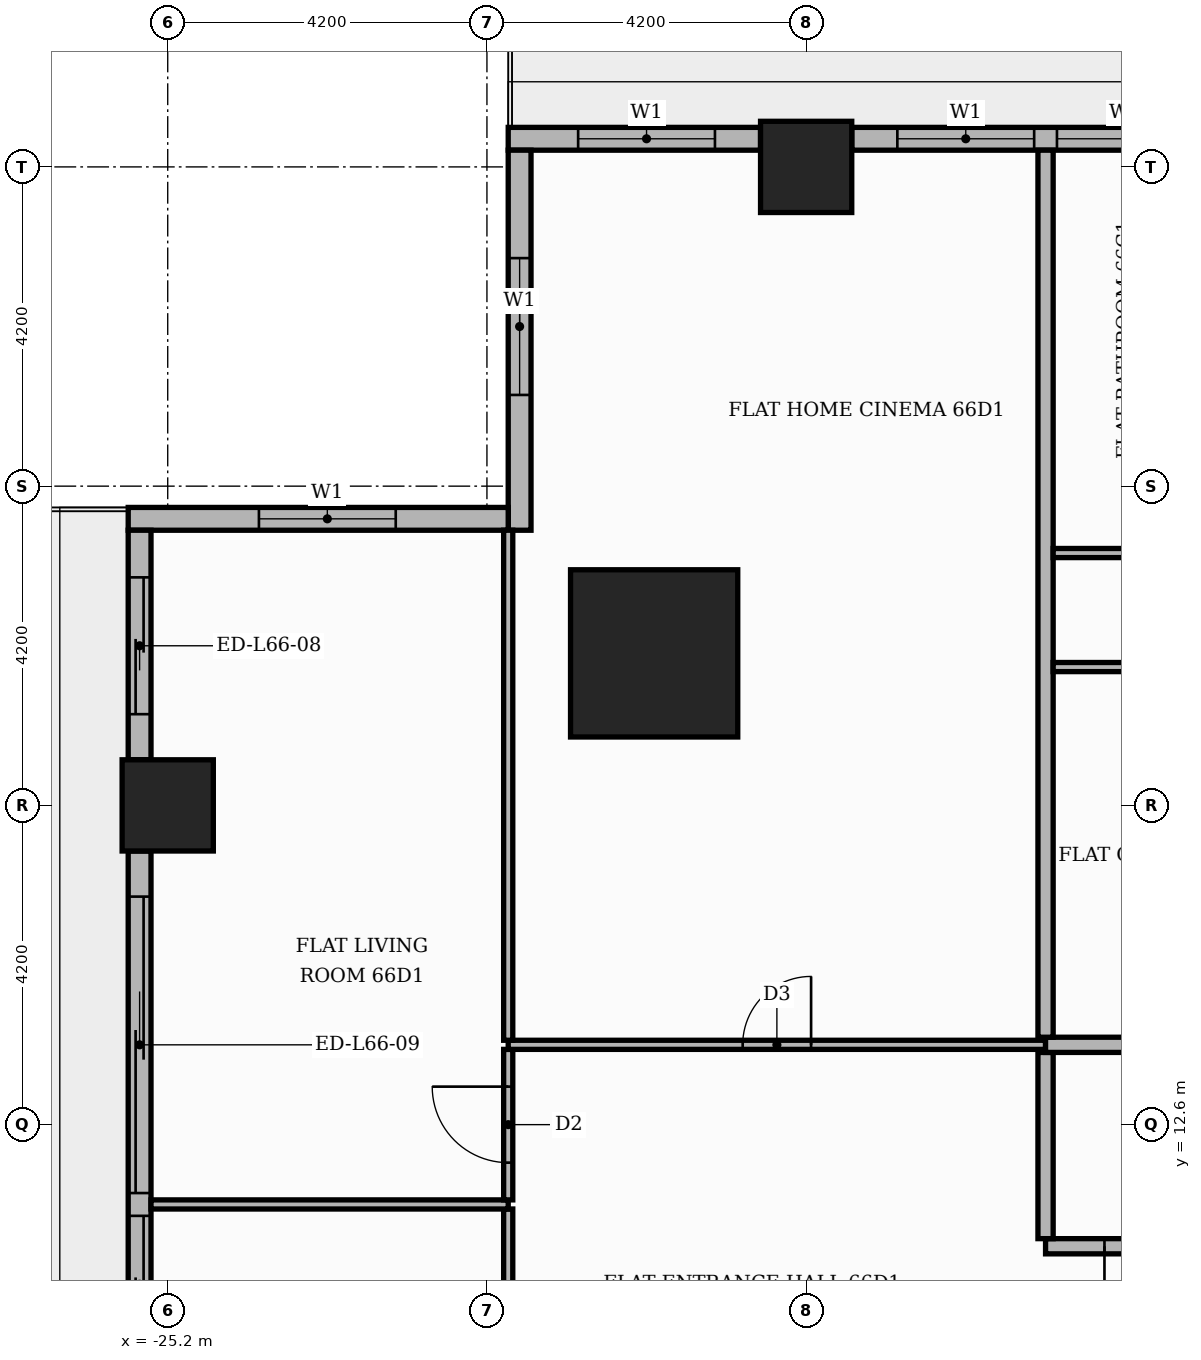
"""IFC4 building model, lengths in metres.
Left out: names, types, materials, properties, quantities, classifications, styles, units other than length and angle.
Written with IfcOpenShell. Run it as: python <this file> out.ifc"""

import sys

from ifc_helpers import new_model, si_unit, direction, frame, frame_2d, origin, origin_2d, place, context, subcontext, project, spatial, rectangle, extrude, element, fill, save


model = new_model("IFC4")
c1 = context("Model", 3, precision=1e-05, world=origin(), true_north=direction((0.0, 1.0)))
c2 = subcontext(c1, "Body", "Model", "MODEL_VIEW")
j1 = project(units=[si_unit("LENGTHUNIT", "METRE"), si_unit("PLANEANGLEUNIT", "RADIAN")], contexts=[c1])
p1 = place(None, origin())
s1 = spatial("IfcSite", under=j1, at=p1, CompositionType="ELEMENT")
p2 = place(p1, origin())
s2 = spatial("IfcBuilding", under=s1, at=p2, CompositionType="ELEMENT")
p3 = place(p2, frame((0.0, 0.0, 275.7)))
s3 = spatial("IfcBuildingStorey", under=s2, at=p3, CompositionType="ELEMENT", Elevation=275.7)
p4 = place(p3, frame((-18.8, 18.8, 0.0), z_axis=(0.0, 0.0, 1.0), x_axis=(1.0, 0.0, 0.0)))
e1 = element("IfcColumn", 1, at=p4, inside=s3, PredefinedType="COLUMN", context=c2, shape_type="SweptSolid", body=[
    extrude(rectangle(XDim=2.2, YDim=2.2, at=origin_2d()), origin(), (0.0, 0.0, 1.0), 3.9),
])
for number, where, z_axis, x_axis in (
    (2, (-16.8, 25.2, 0.0), (0.0, 0.0, 1.0), (1.0, 0.0, 0.0)),
    (3, (-25.2, 16.8, 0.0), (0.0, 0.0, 1.0), (1.0, 0.0, 0.0)),
):
    element("IfcColumn", number, at=place(p3, frame(where, z_axis=z_axis, x_axis=x_axis)), inside=s3, PredefinedType="COLUMN", context=c2, shape_type="SweptSolid", body=[
        extrude(rectangle(XDim=1.2, YDim=1.2, at=origin_2d()), origin(), (0.0, 0.0, 1.0), 3.9),
    ])
p5 = place(p3, frame((-9.0, 25.57, 0.0), z_axis=(0.0, 0.0, 1.0), x_axis=(-1.0, 0.0, 0.0)))
e4 = element("IfcWall", 4, at=p5, inside=s3, PredefinedType="STANDARD", context=c2, shape_type="SweptSolid", body=[
    extrude(rectangle(XDim=7.2, YDim=0.3, at=frame_2d((3.6, 0.0))), origin(), (0.0, 0.0, 1.0), 3.48),
])
p6 = place(p5, frame((0.6, 0.0, 0.9)))
e5 = element("IfcOpeningElement", 5, at=p6, cuts=e4, PredefinedType="OPENING", context=c2, shape_type="SweptSolid", body=[
    extrude(rectangle(XDim=1.8, YDim=2.1, at=frame_2d((0.9, 1.05))), frame((0.0, 0.16, 0.0), z_axis=(0.0, -1.0, 0.0), x_axis=(1.0, 0.0, 0.0)), (0.0, 0.0, 1.0), 0.32),
])
p7 = place(p5, frame((2.7, 0.0, 0.9)))
e6 = element("IfcOpeningElement", 6, at=p7, cuts=e4, PredefinedType="OPENING", context=c2, shape_type="SweptSolid", body=[
    extrude(rectangle(XDim=1.8, YDim=2.1, at=frame_2d((0.9, 1.05))), frame((0.0, 0.16, 0.0), z_axis=(0.0, -1.0, 0.0), x_axis=(1.0, 0.0, 0.0)), (0.0, 0.0, 1.0), 0.32),
])
p8 = place(p5, frame((4.8, 0.0, 0.9)))
e7 = element("IfcOpeningElement", 7, at=p8, cuts=e4, PredefinedType="OPENING", context=c2, shape_type="SweptSolid", body=[
    extrude(rectangle(XDim=1.8, YDim=2.1, at=frame_2d((0.9, 1.05))), frame((0.0, 0.16, 0.0), z_axis=(0.0, -1.0, 0.0), x_axis=(1.0, 0.0, 0.0)), (0.0, 0.0, 1.0), 0.32),
])
p9 = place(p3, frame((-17.4, 25.57, 0.0), z_axis=(0.0, 0.0, 1.0), x_axis=(-1.0, 0.0, 0.0)))
e8 = element("IfcWall", 8, at=p9, inside=s3, PredefinedType="STANDARD", context=c2, shape_type="SweptSolid", body=[
    extrude(rectangle(XDim=3.32, YDim=0.3, at=frame_2d((1.66, 0.0))), origin(), (0.0, 0.0, 1.0), 3.48),
])
p10 = place(p9, frame((0.6, 0.0, 0.9)))
e9 = element("IfcOpeningElement", 9, at=p10, cuts=e8, PredefinedType="OPENING", context=c2, shape_type="SweptSolid", body=[
    extrude(rectangle(XDim=1.8, YDim=2.1, at=frame_2d((0.9, 1.05))), frame((0.0, 0.16, 0.0), z_axis=(0.0, -1.0, 0.0), x_axis=(1.0, 0.0, 0.0)), (0.0, 0.0, 1.0), 0.32),
])
p11 = place(p3, frame((-20.57, 25.42, 0.0), z_axis=(0.0, 0.0, 1.0), x_axis=(0.0, -1.0, 0.0)))
e10 = element("IfcWall", 10, at=p11, inside=s3, PredefinedType="STANDARD", context=c2, shape_type="SweptSolid", body=[
    extrude(rectangle(XDim=5.0, YDim=0.3, at=frame_2d((2.5, 0.0))), origin(), (0.0, 0.0, 1.0), 3.48),
])
p12 = place(p11, frame((1.42, 0.0, 0.9)))
e11 = element("IfcOpeningElement", 11, at=p12, cuts=e10, PredefinedType="OPENING", context=c2, shape_type="SweptSolid", body=[
    extrude(rectangle(XDim=1.8, YDim=2.1, at=frame_2d((0.9, 1.05))), frame((0.0, 0.16, 0.0), z_axis=(0.0, -1.0, 0.0), x_axis=(1.0, 0.0, 0.0)), (0.0, 0.0, 1.0), 0.32),
])
p13 = place(p3, frame((-20.72, 20.57, 0.0), z_axis=(0.0, 0.0, 1.0), x_axis=(-1.0, 0.0, 0.0)))
e12 = element("IfcWall", 12, at=p13, inside=s3, PredefinedType="STANDARD", context=c2, shape_type="SweptSolid", body=[
    extrude(rectangle(XDim=5.0, YDim=0.3, at=frame_2d((2.5, 0.0))), origin(), (0.0, 0.0, 1.0), 3.48),
])
p14 = place(p13, frame((1.48, 0.0, 0.9)))
e13 = element("IfcOpeningElement", 13, at=p14, cuts=e12, PredefinedType="OPENING", context=c2, shape_type="SweptSolid", body=[
    extrude(rectangle(XDim=1.8, YDim=2.1, at=frame_2d((0.9, 1.05))), frame((0.0, 0.16, 0.0), z_axis=(0.0, -1.0, 0.0), x_axis=(1.0, 0.0, 0.0)), (0.0, 0.0, 1.0), 0.32),
])
p15 = place(p3, frame((-25.57, 20.42, 0.0), z_axis=(0.0, 0.0, 1.0), x_axis=(0.0, -1.0, 0.0)))
e14 = element("IfcWall", 14, at=p15, inside=s3, PredefinedType="STANDARD", context=c2, shape_type="SweptSolid", body=[
    extrude(rectangle(XDim=3.02, YDim=0.3, at=frame_2d((1.51, 0.0))), origin(), (0.0, 0.0, 1.0), 3.48),
])
p16 = place(p15, frame((0.62, 0.0, 0.0)))
e15 = element("IfcOpeningElement", 15, at=p16, cuts=e14, PredefinedType="OPENING", context=c2, shape_type="SweptSolid", body=[
    extrude(rectangle(XDim=1.8, YDim=2.4, at=frame_2d((0.9, 1.2))), frame((0.0, 0.16, 0.0), z_axis=(0.0, -1.0, 0.0), x_axis=(1.0, 0.0, 0.0)), (0.0, 0.0, 1.0), 0.32),
])
p17 = place(p3, frame((-25.57, 16.2, 0.0), z_axis=(0.0, 0.0, 1.0), x_axis=(0.0, -1.0, 0.0)))
e16 = element("IfcWall", 16, at=p17, inside=s3, PredefinedType="STANDARD", context=c2, shape_type="SweptSolid", body=[
    extrude(rectangle(XDim=7.2, YDim=0.3, at=frame_2d((3.6, 0.0))), origin(), (0.0, 0.0, 1.0), 3.48),
])
p18 = place(p17, frame((0.6, 0.0, 0.0)))
e17 = element("IfcOpeningElement", 17, at=p18, cuts=e16, PredefinedType="OPENING", context=c2, shape_type="SweptSolid", body=[
    extrude(rectangle(XDim=3.9, YDim=2.4, at=frame_2d((1.95, 1.2))), frame((0.0, 0.16, 0.0), z_axis=(0.0, -1.0, 0.0), x_axis=(1.0, 0.0, 0.0)), (0.0, 0.0, 1.0), 0.32),
])
p19 = place(p17, frame((4.8, 0.0, 0.0)))
e18 = element("IfcOpeningElement", 18, at=p19, cuts=e16, PredefinedType="OPENING", context=c2, shape_type="SweptSolid", body=[
    extrude(rectangle(XDim=1.8, YDim=2.4, at=frame_2d((0.9, 1.2))), frame((0.0, 0.16, 0.0), z_axis=(0.0, -1.0, 0.0), x_axis=(1.0, 0.0, 0.0)), (0.0, 0.0, 1.0), 0.32),
])
p20 = place(p3, frame((-20.72, 7.41, 0.0), z_axis=(0.0, 0.0, 1.0), x_axis=(0.0, 1.0, 0.0)))
e19 = element("IfcWall", 19, at=p20, inside=s3, PredefinedType="PARTITIONING", context=c2, shape_type="SweptSolid", body=[
    extrude(rectangle(XDim=4.08, YDim=0.12, at=frame_2d((2.04, 0.0))), origin(), (0.0, 0.0, 1.0), 3.48),
])
p21 = place(p20, frame((1.59, 0.0, 0.0)))
e20 = element("IfcOpeningElement", 20, at=p21, cuts=e19, PredefinedType="OPENING", context=c2, shape_type="SweptSolid", body=[
    extrude(rectangle(XDim=0.9, YDim=2.1, at=frame_2d((0.45, 1.05))), frame((0.0, 0.07, 0.0), z_axis=(0.0, -1.0, 0.0), x_axis=(1.0, 0.0, 0.0)), (0.0, 0.0, 1.0), 0.14),
])
p22 = place(p3, frame((-13.65, 11.0, 0.0), z_axis=(0.0, 0.0, 1.0), x_axis=(1.0, 0.0, 0.0)))
e21 = element("IfcWall", 21, at=p22, inside=s3, PredefinedType="PARTITIONING", context=c2, shape_type="SweptSolid", body=[
    extrude(rectangle(XDim=2.65, YDim=0.2, at=frame_2d((1.325, 0.0))), origin(), (0.0, 0.0, 1.0), 3.48),
])
p23 = place(p22, frame((0.775, 0.0, 0.0)))
e22 = element("IfcOpeningElement", 22, at=p23, cuts=e21, PredefinedType="OPENING", context=c2, shape_type="SweptSolid", body=[
    extrude(rectangle(XDim=1.1, YDim=2.4, at=frame_2d((0.55, 1.2))), frame((0.0, 0.11, 0.0), z_axis=(0.0, -1.0, 0.0), x_axis=(1.0, 0.0, 0.0)), (0.0, 0.0, 1.0), 0.22),
])
p24 = place(p3, frame((-13.65, 11.1, 0.0), z_axis=(0.0, 0.0, 1.0), x_axis=(0.0, 1.0, 0.0)))
e23 = element("IfcWall", 23, at=p24, inside=s3, PredefinedType="PARTITIONING", context=c2, shape_type="SweptSolid", body=[
    extrude(rectangle(XDim=2.45, YDim=0.2, at=frame_2d((1.225, 0.0))), origin(), (0.0, 0.0, 1.0), 3.48),
])
p25 = place(p3, frame((-25.42, 11.55, 0.0), z_axis=(0.0, 0.0, 1.0), x_axis=(1.0, 0.0, 0.0)))
e24 = element("IfcWall", 24, at=p25, inside=s3, PredefinedType="PARTITIONING", context=c2, shape_type="SweptSolid", body=[
    extrude(rectangle(XDim=4.7, YDim=0.12, at=frame_2d((2.35, 0.0))), origin(), (0.0, 0.0, 1.0), 3.48),
])
p26 = place(p3, frame((-20.72, 11.61, 0.0), z_axis=(0.0, 0.0, 1.0), x_axis=(0.0, 1.0, 0.0)))
e25 = element("IfcWall", 25, at=p26, inside=s3, PredefinedType="PARTITIONING", context=c2, shape_type="SweptSolid", body=[
    extrude(rectangle(XDim=1.98, YDim=0.12, at=frame_2d((0.99, 0.0))), origin(), (0.0, 0.0, 1.0), 3.48),
])
p27 = place(p26, frame((0.49, 0.0, 0.0)))
e26 = element("IfcOpeningElement", 26, at=p27, cuts=e25, PredefinedType="OPENING", context=c2, shape_type="SweptSolid", body=[
    extrude(rectangle(XDim=1.0, YDim=2.1, at=frame_2d((0.5, 1.05))), frame((0.0, 0.07, 0.0), z_axis=(0.0, -1.0, 0.0), x_axis=(1.0, 0.0, 0.0)), (0.0, 0.0, 1.0), 0.14),
])
p28 = place(p3, frame((-20.72, 13.65, 0.0), z_axis=(0.0, 0.0, 1.0), x_axis=(1.0, 0.0, 0.0)))
e27 = element("IfcWall", 27, at=p28, inside=s3, PredefinedType="PARTITIONING", context=c2, shape_type="SweptSolid", body=[
    extrude(rectangle(XDim=7.07, YDim=0.12, at=frame_2d((3.535, 0.0))), origin(), (0.0, 0.0, 1.0), 3.48),
])
p29 = place(p28, frame((3.085, 0.0, 0.0)))
e28 = element("IfcOpeningElement", 28, at=p29, cuts=e27, PredefinedType="OPENING", context=c2, shape_type="SweptSolid", body=[
    extrude(rectangle(XDim=0.9, YDim=2.1, at=frame_2d((0.45, 1.05))), frame((0.0, 0.07, 0.0), z_axis=(0.0, -1.0, 0.0), x_axis=(1.0, 0.0, 0.0)), (0.0, 0.0, 1.0), 0.14),
])
p30 = place(p3, frame((-13.65, 13.65, 0.0), z_axis=(0.0, 0.0, 1.0), x_axis=(1.0, 0.0, 0.0)))
e29 = element("IfcWall", 29, at=p30, inside=s3, PredefinedType="PARTITIONING", context=c2, shape_type="SweptSolid", body=[
    extrude(rectangle(XDim=39.07, YDim=0.2, at=frame_2d((19.535, 0.0))), origin(), (0.0, 0.0, 1.0), 3.48),
])
p31 = place(p30, frame((23.6, 0.0, 0.0)))
e30 = element("IfcOpeningElement", 30, at=p31, cuts=e29, PredefinedType="OPENING", context=c2, shape_type="SweptSolid", body=[
    extrude(rectangle(XDim=1.1, YDim=2.4, at=frame_2d((0.55, 1.2))), frame((0.0, 0.11, 0.0), z_axis=(0.0, -1.0, 0.0), x_axis=(1.0, 0.0, 0.0)), (0.0, 0.0, 1.0), 0.22),
])
p32 = place(p3, frame((-20.72, 13.71, 0.0), z_axis=(0.0, 0.0, 1.0), x_axis=(0.0, 1.0, 0.0)))
e31 = element("IfcWall", 31, at=p32, inside=s3, PredefinedType="PARTITIONING", context=c2, shape_type="SweptSolid", body=[
    extrude(rectangle(XDim=6.71, YDim=0.12, at=frame_2d((3.355, 0.0))), origin(), (0.0, 0.0, 1.0), 3.48),
])
p33 = place(p3, frame((-13.65, 13.75, 0.0), z_axis=(0.0, 0.0, 1.0), x_axis=(0.0, 1.0, 0.0)))
e32 = element("IfcWall", 32, at=p33, inside=s3, PredefinedType="PARTITIONING", context=c2, shape_type="SweptSolid", body=[
    extrude(rectangle(XDim=11.67, YDim=0.2, at=frame_2d((5.835, 0.0))), origin(), (0.0, 0.0, 1.0), 3.48),
])
p34 = place(p3, frame((-13.55, 18.62, 0.0), z_axis=(0.0, 0.0, 1.0), x_axis=(1.0, 0.0, 0.0)))
e33 = element("IfcWall", 33, at=p34, inside=s3, PredefinedType="PARTITIONING", context=c2, shape_type="SweptSolid", body=[
    extrude(rectangle(XDim=20.9, YDim=0.12, at=frame_2d((10.45, 0.0))), origin(), (0.0, 0.0, 1.0), 3.48),
])
p35 = place(p34, frame((17.3, 0.0, 0.0)))
e34 = element("IfcOpeningElement", 34, at=p35, cuts=e33, PredefinedType="OPENING", context=c2, shape_type="SweptSolid", body=[
    extrude(rectangle(XDim=0.9, YDim=2.1, at=frame_2d((0.45, 1.05))), frame((0.0, 0.07, 0.0), z_axis=(0.0, -1.0, 0.0), x_axis=(1.0, 0.0, 0.0)), (0.0, 0.0, 1.0), 0.14),
])
p36 = place(p34, frame((12.05, 0.0, 0.0)))
e35 = element("IfcOpeningElement", 35, at=p36, cuts=e33, PredefinedType="OPENING", context=c2, shape_type="SweptSolid", body=[
    extrude(rectangle(XDim=0.9, YDim=2.1, at=frame_2d((0.45, 1.05))), frame((0.0, 0.07, 0.0), z_axis=(0.0, -1.0, 0.0), x_axis=(1.0, 0.0, 0.0)), (0.0, 0.0, 1.0), 0.14),
])
p37 = place(p34, frame((8.9, 0.0, 0.0)))
e36 = element("IfcOpeningElement", 36, at=p37, cuts=e33, PredefinedType="OPENING", context=c2, shape_type="SweptSolid", body=[
    extrude(rectangle(XDim=0.9, YDim=2.1, at=frame_2d((0.45, 1.05))), frame((0.0, 0.07, 0.0), z_axis=(0.0, -1.0, 0.0), x_axis=(1.0, 0.0, 0.0)), (0.0, 0.0, 1.0), 0.14),
])
p38 = place(p34, frame((5.9, 0.0, 0.0)))
e37 = element("IfcOpeningElement", 37, at=p38, cuts=e33, PredefinedType="OPENING", context=c2, shape_type="SweptSolid", body=[
    extrude(rectangle(XDim=0.9, YDim=2.1, at=frame_2d((0.45, 1.05))), frame((0.0, 0.07, 0.0), z_axis=(0.0, -1.0, 0.0), x_axis=(1.0, 0.0, 0.0)), (0.0, 0.0, 1.0), 0.14),
])
p39 = place(p34, frame((1.7, 0.0, 0.0)))
e38 = element("IfcOpeningElement", 38, at=p39, cuts=e33, PredefinedType="OPENING", context=c2, shape_type="SweptSolid", body=[
    extrude(rectangle(XDim=0.9, YDim=2.1, at=frame_2d((0.45, 1.05))), frame((0.0, 0.07, 0.0), z_axis=(0.0, -1.0, 0.0), x_axis=(1.0, 0.0, 0.0)), (0.0, 0.0, 1.0), 0.14),
])
p40 = place(p3, frame((-13.55, 20.12, 0.0), z_axis=(0.0, 0.0, 1.0), x_axis=(1.0, 0.0, 0.0)))
e39 = element("IfcWall", 39, at=p40, inside=s3, PredefinedType="PARTITIONING", context=c2, shape_type="SweptSolid", body=[
    extrude(rectangle(XDim=34.269, YDim=0.12, at=frame_2d((17.135, 0.0))), origin(), (0.0, 0.0, 1.0), 3.48),
])
p41 = place(p40, frame((25.65, 0.0, 0.0)))
e40 = element("IfcOpeningElement", 40, at=p41, cuts=e39, PredefinedType="OPENING", context=c2, shape_type="SweptSolid", body=[
    extrude(rectangle(XDim=1.0, YDim=2.1, at=frame_2d((0.5, 1.05))), frame((0.0, 0.07, 0.0), z_axis=(0.0, -1.0, 0.0), x_axis=(1.0, 0.0, 0.0)), (0.0, 0.0, 1.0), 0.14),
])
p42 = place(p40, frame((22.55, 0.0, 0.0)))
e41 = element("IfcOpeningElement", 41, at=p42, cuts=e39, PredefinedType="OPENING", context=c2, shape_type="SweptSolid", body=[
    extrude(rectangle(XDim=0.9, YDim=2.1, at=frame_2d((0.45, 1.05))), frame((0.0, 0.07, 0.0), z_axis=(0.0, -1.0, 0.0), x_axis=(1.0, 0.0, 0.0)), (0.0, 0.0, 1.0), 0.14),
])
p43 = place(p40, frame((18.35, 0.0, 0.0)))
e42 = element("IfcOpeningElement", 42, at=p43, cuts=e39, PredefinedType="OPENING", context=c2, shape_type="SweptSolid", body=[
    extrude(rectangle(XDim=0.9, YDim=2.1, at=frame_2d((0.45, 1.05))), frame((0.0, 0.07, 0.0), z_axis=(0.0, -1.0, 0.0), x_axis=(1.0, 0.0, 0.0)), (0.0, 0.0, 1.0), 0.14),
])
p44 = place(p40, frame((9.95, 0.0, 0.0)))
e43 = element("IfcOpeningElement", 43, at=p44, cuts=e39, PredefinedType="OPENING", context=c2, shape_type="SweptSolid", body=[
    extrude(rectangle(XDim=0.9, YDim=2.1, at=frame_2d((0.45, 1.05))), frame((0.0, 0.07, 0.0), z_axis=(0.0, -1.0, 0.0), x_axis=(1.0, 0.0, 0.0)), (0.0, 0.0, 1.0), 0.14),
])
p45 = place(p40, frame((3.65, 0.0, 0.0)))
e44 = element("IfcOpeningElement", 44, at=p45, cuts=e39, PredefinedType="OPENING", context=c2, shape_type="SweptSolid", body=[
    extrude(rectangle(XDim=0.9, YDim=2.1, at=frame_2d((0.45, 1.05))), frame((0.0, 0.07, 0.0), z_axis=(0.0, -1.0, 0.0), x_axis=(1.0, 0.0, 0.0)), (0.0, 0.0, 1.0), 0.14),
])
p46 = place(p7, origin())
e45 = element("IfcWindow", 45, at=p46, inside=s3, PartitioningType="SINGLE_PANEL", PredefinedType="WINDOW", context=c2, shape_type="SweptSolid", body=[
    extrude(rectangle(XDim=1.8, YDim=2.1, at=frame_2d((0.9, 1.05))), frame((0.0, 0.03, 0.0), z_axis=(0.0, -1.0, 0.0), x_axis=(1.0, 0.0, 0.0)), (0.0, 0.0, 1.0), 0.06),
])
fill(e6, e45)
p47 = place(p8, origin())
e46 = element("IfcWindow", 46, at=p47, inside=s3, PartitioningType="SINGLE_PANEL", PredefinedType="WINDOW", context=c2, shape_type="SweptSolid", body=[
    extrude(rectangle(XDim=1.8, YDim=2.1, at=frame_2d((0.9, 1.05))), frame((0.0, 0.03, 0.0), z_axis=(0.0, -1.0, 0.0), x_axis=(1.0, 0.0, 0.0)), (0.0, 0.0, 1.0), 0.06),
])
fill(e7, e46)
p48 = place(p10, origin())
e47 = element("IfcWindow", 47, at=p48, inside=s3, PartitioningType="SINGLE_PANEL", PredefinedType="WINDOW", context=c2, shape_type="SweptSolid", body=[
    extrude(rectangle(XDim=1.8, YDim=2.1, at=frame_2d((0.9, 1.05))), frame((0.0, 0.03, 0.0), z_axis=(0.0, -1.0, 0.0), x_axis=(1.0, 0.0, 0.0)), (0.0, 0.0, 1.0), 0.06),
])
fill(e9, e47)
p49 = place(p12, origin())
e48 = element("IfcWindow", 48, at=p49, inside=s3, PartitioningType="SINGLE_PANEL", PredefinedType="WINDOW", context=c2, shape_type="SweptSolid", body=[
    extrude(rectangle(XDim=1.8, YDim=2.1, at=frame_2d((0.9, 1.05))), frame((0.0, 0.03, 0.0), z_axis=(0.0, -1.0, 0.0), x_axis=(1.0, 0.0, 0.0)), (0.0, 0.0, 1.0), 0.06),
])
fill(e11, e48)
p50 = place(p14, origin())
e49 = element("IfcWindow", 49, at=p50, inside=s3, PartitioningType="SINGLE_PANEL", PredefinedType="WINDOW", context=c2, shape_type="SweptSolid", body=[
    extrude(rectangle(XDim=1.8, YDim=2.1, at=frame_2d((0.9, 1.05))), frame((0.0, 0.03, 0.0), z_axis=(0.0, -1.0, 0.0), x_axis=(1.0, 0.0, 0.0)), (0.0, 0.0, 1.0), 0.06),
])
fill(e13, e49)
p51 = place(p16, origin())
e50 = element("IfcDoor", 50, at=p51, inside=s3, OperationType="SLIDING_TO_RIGHT", PredefinedType="DOOR", context=c2, shape_type="SweptSolid", body=[
    extrude(rectangle(XDim=1.8, YDim=2.4, at=frame_2d((0.9, 1.2))), frame((0.0, 0.025, 0.0), z_axis=(0.0, -1.0, 0.0), x_axis=(1.0, 0.0, 0.0)), (0.0, 0.0, 1.0), 0.05),
])
fill(e15, e50)
p52 = place(p18, origin())
e51 = element("IfcDoor", 51, at=p52, inside=s3, OperationType="SLIDING_TO_LEFT", PredefinedType="DOOR", context=c2, shape_type="SweptSolid", body=[
    extrude(rectangle(XDim=3.9, YDim=2.4, at=frame_2d((1.95, 1.2))), frame((0.0, 0.025, 0.0), z_axis=(0.0, -1.0, 0.0), x_axis=(1.0, 0.0, 0.0)), (0.0, 0.0, 1.0), 0.05),
])
fill(e17, e51)
p53 = place(p19, origin())
e52 = element("IfcDoor", 52, at=p53, inside=s3, OperationType="SLIDING_TO_RIGHT", PredefinedType="DOOR", context=c2, shape_type="SweptSolid", body=[
    extrude(rectangle(XDim=1.8, YDim=2.4, at=frame_2d((0.9, 1.2))), frame((0.0, 0.025, 0.0), z_axis=(0.0, -1.0, 0.0), x_axis=(1.0, 0.0, 0.0)), (0.0, 0.0, 1.0), 0.05),
])
fill(e18, e52)
p54 = place(p23, frame((1.1, 0.0, 0.0), z_axis=(0.0, 0.0, 1.0), x_axis=(-1.0, 0.0, 0.0)))
e53 = element("IfcDoor", 53, at=p54, inside=s3, OperationType="SINGLE_SWING_LEFT", PredefinedType="DOOR", context=c2, shape_type="SweptSolid", body=[
    extrude(rectangle(XDim=1.1, YDim=2.4, at=frame_2d((0.55, 1.2))), frame((0.0, 0.025, 0.0), z_axis=(0.0, -1.0, 0.0), x_axis=(1.0, 0.0, 0.0)), (0.0, 0.0, 1.0), 0.05),
])
fill(e22, e53)
p55 = place(p29, origin())
e54 = element("IfcDoor", 54, at=p55, inside=s3, OperationType="SINGLE_SWING_RIGHT", PredefinedType="DOOR", context=c2, shape_type="SweptSolid", body=[
    extrude(rectangle(XDim=0.9, YDim=2.1, at=frame_2d((0.45, 1.05))), frame((0.0, 0.025, 0.0), z_axis=(0.0, -1.0, 0.0), x_axis=(1.0, 0.0, 0.0)), (0.0, 0.0, 1.0), 0.05),
])
fill(e28, e54)
p56 = place(p27, origin())
e55 = element("IfcDoor", 55, at=p56, inside=s3, OperationType="SINGLE_SWING_RIGHT", PredefinedType="DOOR", context=c2, shape_type="SweptSolid", body=[
    extrude(rectangle(XDim=1.0, YDim=2.1, at=frame_2d((0.5, 1.05))), frame((0.0, 0.025, 0.0), z_axis=(0.0, -1.0, 0.0), x_axis=(1.0, 0.0, 0.0)), (0.0, 0.0, 1.0), 0.05),
])
fill(e26, e55)
save(model, sys.argv[1])
